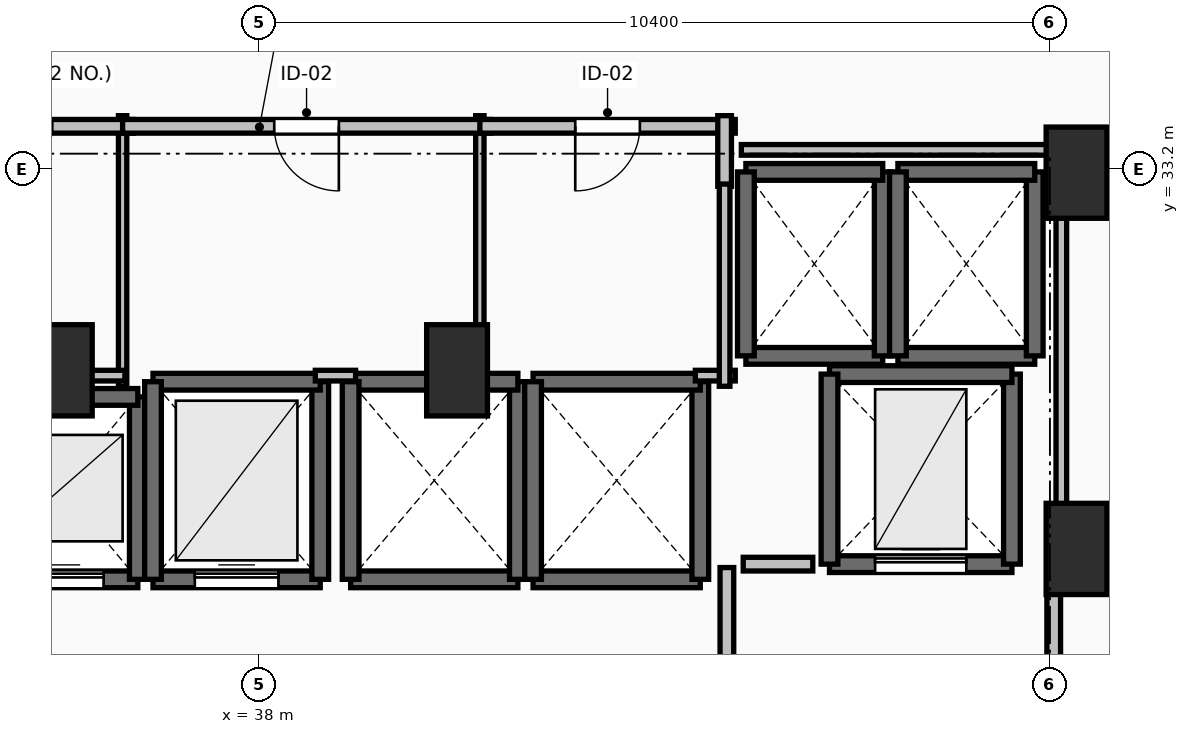
"""IFC4 building model, lengths in metres.
Left out: names, types, materials, properties, quantities, classifications, styles, units other than length and angle.
Written with IfcOpenShell. Run it as: python <this file> out.ifc"""

import sys

from ifc_helpers import new_model, si_unit, direction, frame, frame_2d, origin, origin_2d, place, context, subcontext, project, spatial, rectangle, extrude, element, fill, save


model = new_model("IFC4")
c1 = context("Model", 3, precision=1e-05, world=origin(), true_north=direction((0.0, 1.0)))
c2 = subcontext(c1, "Body", "Model", "MODEL_VIEW")
j1 = project(units=[si_unit("LENGTHUNIT", "METRE"), si_unit("PLANEANGLEUNIT", "RADIAN")], contexts=[c1])
p1 = place(None, origin())
s1 = spatial("IfcSite", under=j1, at=p1, CompositionType="ELEMENT")
p2 = place(p1, origin())
s2 = spatial("IfcBuilding", under=s1, at=p2, CompositionType="ELEMENT")
p3 = place(p2, frame((0.0, 0.0, 85.8)))
s3 = spatial("IfcBuildingStorey", under=s2, at=p3, CompositionType="ELEMENT", Elevation=85.8)
for number, where, z_axis, x_axis in (
    (1, (48.75, 33.15, 0.0), (0.0, 0.0, 1.0), (1.0, 0.0, 0.0)),
    (2, (48.75, 28.2, 0.0), (0.0, 0.0, 1.0), (1.0, 0.0, 0.0)),
    (3, (35.4, 30.55, 0.0), (0.0, 0.0, 1.0), (1.0, 0.0, 0.0)),
    (4, (40.6, 30.55, 0.0), (0.0, 0.0, 1.0), (1.0, 0.0, 0.0)),
):
    element("IfcColumn", number, at=place(p3, frame(where, z_axis=z_axis, x_axis=x_axis)), inside=s3, PredefinedType="PILASTER", context=c2, shape_type="SweptSolid", body=[
        extrude(rectangle(XDim=0.8, YDim=1.2, at=origin_2d()), origin(), (0.0, 0.0, 1.0), 3.5),
    ])
p4 = place(p3, frame((34.4, 27.8, 0.0), z_axis=(0.0, 0.0, 1.0), x_axis=(1.0, 0.0, 0.0)))
e5 = element("IfcWall", 5, at=p4, inside=s3, PredefinedType="SOLIDWALL", context=c2, shape_type="SweptSolid", body=[
    extrude(rectangle(XDim=2.0, YDim=0.22, at=frame_2d((1.0, 0.0))), origin(), (0.0, 0.0, 1.0), 3.24),
])
p5 = place(p4, frame((0.45, 0.0, 0.0)))
e6 = element("IfcOpeningElement", 6, at=p5, cuts=e5, PredefinedType="OPENING", context=c2, shape_type="SweptSolid", body=[
    extrude(rectangle(XDim=1.1, YDim=2.2, at=frame_2d((0.55, 1.1))), frame((0.0, 0.125, 0.0), z_axis=(0.0, -1.0, 0.0), x_axis=(1.0, 0.0, 0.0)), (0.0, 0.0, 1.0), 0.25),
])
p6 = place(p3, frame((36.4, 27.8, 0.0), z_axis=(0.0, 0.0, 1.0), x_axis=(0.0, 1.0, 0.0)))
e7 = element("IfcWall", 7, at=p6, inside=s3, PredefinedType="SOLIDWALL", context=c2, shape_type="SweptSolid", body=[
    extrude(rectangle(XDim=2.4, YDim=0.22, at=frame_2d((1.2, 0.0))), origin(), (0.0, 0.0, 1.0), 3.24),
])
p7 = place(p3, frame((36.4, 30.2, 0.0), z_axis=(0.0, 0.0, 1.0), x_axis=(-1.0, 0.0, 0.0)))
e8 = element("IfcWall", 8, at=p7, inside=s3, PredefinedType="SOLIDWALL", context=c2, shape_type="SweptSolid", body=[
    extrude(rectangle(XDim=2.0, YDim=0.22, at=frame_2d((1.0, 0.0))), origin(), (0.0, 0.0, 1.0), 3.24),
])
p8 = place(p3, frame((36.6, 27.8, 0.0), z_axis=(0.0, 0.0, 1.0), x_axis=(1.0, 0.0, 0.0)))
e9 = element("IfcWall", 9, at=p8, inside=s3, PredefinedType="SOLIDWALL", context=c2, shape_type="SweptSolid", body=[
    extrude(rectangle(XDim=2.2, YDim=0.22, at=frame_2d((1.1, 0.0))), origin(), (0.0, 0.0, 1.0), 3.24),
])
p9 = place(p8, frame((0.55, 0.0, 0.0)))
e10 = element("IfcOpeningElement", 10, at=p9, cuts=e9, PredefinedType="OPENING", context=c2, shape_type="SweptSolid", body=[
    extrude(rectangle(XDim=1.1, YDim=2.2, at=frame_2d((0.55, 1.1))), frame((0.0, 0.125, 0.0), z_axis=(0.0, -1.0, 0.0), x_axis=(1.0, 0.0, 0.0)), (0.0, 0.0, 1.0), 0.25),
])
p10 = place(p3, frame((38.8, 27.8, 0.0), z_axis=(0.0, 0.0, 1.0), x_axis=(0.0, 1.0, 0.0)))
e11 = element("IfcWall", 11, at=p10, inside=s3, PredefinedType="SOLIDWALL", context=c2, shape_type="SweptSolid", body=[
    extrude(rectangle(XDim=2.6, YDim=0.22, at=frame_2d((1.3, 0.0))), origin(), (0.0, 0.0, 1.0), 3.24),
])
p11 = place(p3, frame((38.8, 30.4, 0.0), z_axis=(0.0, 0.0, 1.0), x_axis=(-1.0, 0.0, 0.0)))
e12 = element("IfcWall", 12, at=p11, inside=s3, PredefinedType="SOLIDWALL", context=c2, shape_type="SweptSolid", body=[
    extrude(rectangle(XDim=2.2, YDim=0.22, at=frame_2d((1.1, 0.0))), origin(), (0.0, 0.0, 1.0), 3.24),
])
p12 = place(p3, frame((36.6, 30.4, 0.0), z_axis=(0.0, 0.0, 1.0), x_axis=(0.0, -1.0, 0.0)))
e13 = element("IfcWall", 13, at=p12, inside=s3, PredefinedType="SOLIDWALL", context=c2, shape_type="SweptSolid", body=[
    extrude(rectangle(XDim=2.6, YDim=0.22, at=frame_2d((1.3, 0.0))), origin(), (0.0, 0.0, 1.0), 3.24),
])
p13 = place(p3, frame((39.2, 27.8, 0.0), z_axis=(0.0, 0.0, 1.0), x_axis=(1.0, 0.0, 0.0)))
e14 = element("IfcWall", 14, at=p13, inside=s3, PredefinedType="SOLIDWALL", context=c2, shape_type="SweptSolid", body=[
    extrude(rectangle(XDim=2.2, YDim=0.22, at=frame_2d((1.1, 0.0))), origin(), (0.0, 0.0, 1.0), 3.24),
])
p14 = place(p3, frame((41.4, 27.8, 0.0), z_axis=(0.0, 0.0, 1.0), x_axis=(0.0, 1.0, 0.0)))
e15 = element("IfcWall", 15, at=p14, inside=s3, PredefinedType="SOLIDWALL", context=c2, shape_type="SweptSolid", body=[
    extrude(rectangle(XDim=2.6, YDim=0.22, at=frame_2d((1.3, 0.0))), origin(), (0.0, 0.0, 1.0), 3.24),
])
p15 = place(p3, frame((41.4, 30.4, 0.0), z_axis=(0.0, 0.0, 1.0), x_axis=(-1.0, 0.0, 0.0)))
e16 = element("IfcWall", 16, at=p15, inside=s3, PredefinedType="SOLIDWALL", context=c2, shape_type="SweptSolid", body=[
    extrude(rectangle(XDim=2.2, YDim=0.22, at=frame_2d((1.1, 0.0))), origin(), (0.0, 0.0, 1.0), 3.24),
])
p16 = place(p3, frame((39.2, 30.4, 0.0), z_axis=(0.0, 0.0, 1.0), x_axis=(0.0, -1.0, 0.0)))
e17 = element("IfcWall", 17, at=p16, inside=s3, PredefinedType="SOLIDWALL", context=c2, shape_type="SweptSolid", body=[
    extrude(rectangle(XDim=2.6, YDim=0.22, at=frame_2d((1.3, 0.0))), origin(), (0.0, 0.0, 1.0), 3.24),
])
p17 = place(p3, frame((41.6, 27.8, 0.0), z_axis=(0.0, 0.0, 1.0), x_axis=(1.0, 0.0, 0.0)))
e18 = element("IfcWall", 18, at=p17, inside=s3, PredefinedType="SOLIDWALL", context=c2, shape_type="SweptSolid", body=[
    extrude(rectangle(XDim=2.2, YDim=0.22, at=frame_2d((1.1, 0.0))), origin(), (0.0, 0.0, 1.0), 3.24),
])
p18 = place(p3, frame((43.8, 27.8, 0.0), z_axis=(0.0, 0.0, 1.0), x_axis=(0.0, 1.0, 0.0)))
e19 = element("IfcWall", 19, at=p18, inside=s3, PredefinedType="SOLIDWALL", context=c2, shape_type="SweptSolid", body=[
    extrude(rectangle(XDim=2.6, YDim=0.22, at=frame_2d((1.3, 0.0))), origin(), (0.0, 0.0, 1.0), 3.24),
])
p19 = place(p3, frame((43.8, 30.4, 0.0), z_axis=(0.0, 0.0, 1.0), x_axis=(-1.0, 0.0, 0.0)))
e20 = element("IfcWall", 20, at=p19, inside=s3, PredefinedType="SOLIDWALL", context=c2, shape_type="SweptSolid", body=[
    extrude(rectangle(XDim=2.2, YDim=0.22, at=frame_2d((1.1, 0.0))), origin(), (0.0, 0.0, 1.0), 3.24),
])
p20 = place(p3, frame((41.6, 30.4, 0.0), z_axis=(0.0, 0.0, 1.0), x_axis=(0.0, -1.0, 0.0)))
e21 = element("IfcWall", 21, at=p20, inside=s3, PredefinedType="SOLIDWALL", context=c2, shape_type="SweptSolid", body=[
    extrude(rectangle(XDim=2.6, YDim=0.22, at=frame_2d((1.3, 0.0))), origin(), (0.0, 0.0, 1.0), 3.24),
])
p21 = place(p3, frame((44.4, 30.74, 0.0), z_axis=(0.0, 0.0, 1.0), x_axis=(1.0, 0.0, 0.0)))
e22 = element("IfcWall", 22, at=p21, inside=s3, PredefinedType="SOLIDWALL", context=c2, shape_type="SweptSolid", body=[
    extrude(rectangle(XDim=1.8, YDim=0.22, at=frame_2d((0.9, 0.0))), origin(), (0.0, 0.0, 1.0), 3.24),
])
p22 = place(p3, frame((46.2, 30.74, 0.0), z_axis=(0.0, 0.0, 1.0), x_axis=(0.0, 1.0, 0.0)))
e23 = element("IfcWall", 23, at=p22, inside=s3, PredefinedType="SOLIDWALL", context=c2, shape_type="SweptSolid", body=[
    extrude(rectangle(XDim=2.42, YDim=0.22, at=frame_2d((1.21, 0.0))), origin(), (0.0, 0.0, 1.0), 3.24),
])
p23 = place(p3, frame((46.2, 33.16, 0.0), z_axis=(0.0, 0.0, 1.0), x_axis=(-1.0, 0.0, 0.0)))
e24 = element("IfcWall", 24, at=p23, inside=s3, PredefinedType="SOLIDWALL", context=c2, shape_type="SweptSolid", body=[
    extrude(rectangle(XDim=1.8, YDim=0.22, at=frame_2d((0.9, 0.0))), origin(), (0.0, 0.0, 1.0), 3.24),
])
p24 = place(p3, frame((44.4, 33.16, 0.0), z_axis=(0.0, 0.0, 1.0), x_axis=(0.0, -1.0, 0.0)))
e25 = element("IfcWall", 25, at=p24, inside=s3, PredefinedType="SOLIDWALL", context=c2, shape_type="SweptSolid", body=[
    extrude(rectangle(XDim=2.42, YDim=0.22, at=frame_2d((1.21, 0.0))), origin(), (0.0, 0.0, 1.0), 3.24),
])
p25 = place(p3, frame((46.4, 30.74, 0.0), z_axis=(0.0, 0.0, 1.0), x_axis=(1.0, 0.0, 0.0)))
e26 = element("IfcWall", 26, at=p25, inside=s3, PredefinedType="SOLIDWALL", context=c2, shape_type="SweptSolid", body=[
    extrude(rectangle(XDim=1.8, YDim=0.22, at=frame_2d((0.9, 0.0))), origin(), (0.0, 0.0, 1.0), 3.24),
])
p26 = place(p3, frame((48.2, 30.74, 0.0), z_axis=(0.0, 0.0, 1.0), x_axis=(0.0, 1.0, 0.0)))
e27 = element("IfcWall", 27, at=p26, inside=s3, PredefinedType="SOLIDWALL", context=c2, shape_type="SweptSolid", body=[
    extrude(rectangle(XDim=2.42, YDim=0.22, at=frame_2d((1.21, 0.0))), origin(), (0.0, 0.0, 1.0), 3.24),
])
p27 = place(p3, frame((48.2, 33.16, 0.0), z_axis=(0.0, 0.0, 1.0), x_axis=(-1.0, 0.0, 0.0)))
e28 = element("IfcWall", 28, at=p27, inside=s3, PredefinedType="SOLIDWALL", context=c2, shape_type="SweptSolid", body=[
    extrude(rectangle(XDim=1.8, YDim=0.22, at=frame_2d((0.9, 0.0))), origin(), (0.0, 0.0, 1.0), 3.24),
])
p28 = place(p3, frame((46.4, 33.16, 0.0), z_axis=(0.0, 0.0, 1.0), x_axis=(0.0, -1.0, 0.0)))
e29 = element("IfcWall", 29, at=p28, inside=s3, PredefinedType="SOLIDWALL", context=c2, shape_type="SweptSolid", body=[
    extrude(rectangle(XDim=2.42, YDim=0.22, at=frame_2d((1.21, 0.0))), origin(), (0.0, 0.0, 1.0), 3.24),
])
p29 = place(p3, frame((45.5, 28.0, 0.0), z_axis=(0.0, 0.0, 1.0), x_axis=(1.0, 0.0, 0.0)))
e30 = element("IfcWall", 30, at=p29, inside=s3, PredefinedType="SHEAR", context=c2, shape_type="SweptSolid", body=[
    extrude(rectangle(XDim=2.4, YDim=0.22, at=frame_2d((1.2, 0.0))), origin(), (0.0, 0.0, 1.0), 3.24),
])
p30 = place(p29, frame((0.6, 0.0, 0.0)))
e31 = element("IfcOpeningElement", 31, at=p30, cuts=e30, PredefinedType="OPENING", context=c2, shape_type="SweptSolid", body=[
    extrude(rectangle(XDim=1.2, YDim=2.2, at=frame_2d((0.6, 1.1))), frame((0.0, 0.125, 0.0), z_axis=(0.0, -1.0, 0.0), x_axis=(1.0, 0.0, 0.0)), (0.0, 0.0, 1.0), 0.25),
])
p31 = place(p3, frame((47.9, 28.0, 0.0), z_axis=(0.0, 0.0, 1.0), x_axis=(0.0, 1.0, 0.0)))
e32 = element("IfcWall", 32, at=p31, inside=s3, PredefinedType="SHEAR", context=c2, shape_type="SweptSolid", body=[
    extrude(rectangle(XDim=2.5, YDim=0.22, at=frame_2d((1.25, 0.0))), origin(), (0.0, 0.0, 1.0), 3.24),
])
p32 = place(p3, frame((47.9, 30.5, 0.0), z_axis=(0.0, 0.0, 1.0), x_axis=(-1.0, 0.0, 0.0)))
e33 = element("IfcWall", 33, at=p32, inside=s3, PredefinedType="SHEAR", context=c2, shape_type="SweptSolid", body=[
    extrude(rectangle(XDim=2.4, YDim=0.22, at=frame_2d((1.2, 0.0))), origin(), (0.0, 0.0, 1.0), 3.24),
])
p33 = place(p3, frame((45.5, 30.5, 0.0), z_axis=(0.0, 0.0, 1.0), x_axis=(0.0, -1.0, 0.0)))
e34 = element("IfcWall", 34, at=p33, inside=s3, PredefinedType="SHEAR", context=c2, shape_type="SweptSolid", body=[
    extrude(rectangle(XDim=2.5, YDim=0.22, at=frame_2d((1.25, 0.0))), origin(), (0.0, 0.0, 1.0), 3.24),
])
p34 = place(p3, frame((44.15, 27.955, 0.0), z_axis=(0.0, 0.0, 1.0), x_axis=(0.0, -1.0, 0.0)))
e35 = element("IfcWall", 35, at=p34, inside=s3, PredefinedType="PARTITIONING", context=c2, shape_type="SweptSolid", body=[
    extrude(rectangle(XDim=3.91, YDim=0.18, at=frame_2d((1.955, 0.0))), origin(), (0.0, 0.0, 1.0), 3.24),
])
p35 = place(p34, frame((1.355, 0.0, 0.0)))
e36 = element("IfcOpeningElement", 36, at=p35, cuts=e35, PredefinedType="OPENING", context=c2, shape_type="SweptSolid", body=[
    extrude(rectangle(XDim=1.2, YDim=2.15, at=frame_2d((0.6, 1.075))), frame((0.0, 0.105, 0.0), z_axis=(0.0, -1.0, 0.0), x_axis=(1.0, 0.0, 0.0)), (0.0, 0.0, 1.0), 0.21),
])
p36 = place(p3, frame((48.45, 23.95, 0.0), z_axis=(0.0, 0.0, 1.0), x_axis=(0.0, 1.0, 0.0)))
e37 = element("IfcWall", 37, at=p36, inside=s3, PredefinedType="PARTITIONING", context=c2, shape_type="SweptSolid", body=[
    extrude(rectangle(XDim=4.05, YDim=0.18, at=frame_2d((2.025, 0.0))), origin(), (0.0, 0.0, 1.0), 3.24),
])
p37 = place(p36, frame((1.425, 0.0, 0.0)))
e38 = element("IfcOpeningElement", 38, at=p37, cuts=e37, PredefinedType="OPENING", context=c2, shape_type="SweptSolid", body=[
    extrude(rectangle(XDim=1.2, YDim=2.15, at=frame_2d((0.6, 1.075))), frame((0.0, 0.105, 0.0), z_axis=(0.0, -1.0, 0.0), x_axis=(1.0, 0.0, 0.0)), (0.0, 0.0, 1.0), 0.21),
])
p38 = place(p3, frame((36.2, 30.34, 0.0), z_axis=(0.0, 0.0, 1.0), x_axis=(0.0, 1.0, 0.0)))
e39 = element("IfcWall", 39, at=p38, inside=s3, PredefinedType="PARTITIONING", context=c2, shape_type="SweptSolid", body=[
    extrude(rectangle(XDim=3.56, YDim=0.11, at=frame_2d((1.78, 0.0))), origin(), (0.0, 0.0, 1.0), 2.432),
])
p39 = place(p3, frame((36.34, 33.76, 0.0), z_axis=(0.0, 0.0, 1.0), x_axis=(-1.0, 0.0, 0.0)))
e40 = element("IfcWall", 40, at=p39, inside=s3, PredefinedType="PARTITIONING", context=c2, shape_type="SweptSolid", body=[
    extrude(rectangle(XDim=2.98, YDim=0.18, at=frame_2d((1.49, 0.0))), origin(), (0.0, 0.0, 1.0), 3.24),
])
p40 = place(p39, frame((1.065, 0.0, 0.0)))
e41 = element("IfcOpeningElement", 41, at=p40, cuts=e40, PredefinedType="OPENING", context=c2, shape_type="SweptSolid", body=[
    extrude(rectangle(XDim=0.85, YDim=2.1, at=frame_2d((0.425, 1.05))), frame((0.0, 0.105, 0.0), z_axis=(0.0, -1.0, 0.0), x_axis=(1.0, 0.0, 0.0)), (0.0, 0.0, 1.0), 0.21),
])
p41 = place(p3, frame((40.9, 30.34, 0.0), z_axis=(0.0, 0.0, 1.0), x_axis=(0.0, 1.0, 0.0)))
e42 = element("IfcWall", 42, at=p41, inside=s3, PredefinedType="PARTITIONING", context=c2, shape_type="SweptSolid", body=[
    extrude(rectangle(XDim=3.56, YDim=0.11, at=frame_2d((1.78, 0.0))), origin(), (0.0, 0.0, 1.0), 3.24),
])
p42 = place(p3, frame((41.04, 33.76, 0.0), z_axis=(0.0, 0.0, 1.0), x_axis=(-1.0, 0.0, 0.0)))
e43 = element("IfcWall", 43, at=p42, inside=s3, PredefinedType="PARTITIONING", context=c2, shape_type="SweptSolid", body=[
    extrude(rectangle(XDim=4.84, YDim=0.18, at=frame_2d((2.42, 0.0))), origin(), (0.0, 0.0, 1.0), 3.24),
])
p43 = place(p42, frame((1.995, 0.0, 0.0)))
e44 = element("IfcOpeningElement", 44, at=p43, cuts=e43, PredefinedType="OPENING", context=c2, shape_type="SweptSolid", body=[
    extrude(rectangle(XDim=0.85, YDim=2.1, at=frame_2d((0.425, 1.05))), frame((0.0, 0.105, 0.0), z_axis=(0.0, -1.0, 0.0), x_axis=(1.0, 0.0, 0.0)), (0.0, 0.0, 1.0), 0.21),
])
p44 = place(p3, frame((44.26, 33.76, 0.0), z_axis=(0.0, 0.0, 1.0), x_axis=(-1.0, 0.0, 0.0)))
e45 = element("IfcWall", 45, at=p44, inside=s3, PredefinedType="PARTITIONING", context=c2, shape_type="SweptSolid", body=[
    extrude(rectangle(XDim=3.36, YDim=0.18, at=frame_2d((1.68, 0.0))), origin(), (0.0, 0.0, 1.0), 3.24),
])
p45 = place(p44, frame((1.255, 0.0, 0.0)))
e46 = element("IfcOpeningElement", 46, at=p45, cuts=e45, PredefinedType="OPENING", context=c2, shape_type="SweptSolid", body=[
    extrude(rectangle(XDim=0.85, YDim=2.1, at=frame_2d((0.425, 1.05))), frame((0.0, 0.105, 0.0), z_axis=(0.0, -1.0, 0.0), x_axis=(1.0, 0.0, 0.0)), (0.0, 0.0, 1.0), 0.21),
])
p46 = place(p3, frame((44.12, 32.97, 0.0), z_axis=(0.0, 0.0, 1.0), x_axis=(0.0, 1.0, 0.0)))
e47 = element("IfcWall", 47, at=p46, inside=s3, PredefinedType="PARTITIONING", context=c2, shape_type="SweptSolid", body=[
    extrude(rectangle(XDim=0.93, YDim=0.18, at=frame_2d((0.465, 0.0))), origin(), (0.0, 0.0, 1.0), 3.24),
])
p47 = place(p3, frame((45.28, 28.0, 0.0), z_axis=(0.0, 0.0, 1.0), x_axis=(-1.0, 0.0, 0.0)))
e48 = element("IfcWall", 48, at=p47, inside=s3, PredefinedType="PARTITIONING", context=c2, shape_type="SweptSolid", body=[
    extrude(rectangle(XDim=0.915, YDim=0.18, at=frame_2d((0.458, 0.0))), origin(), (0.0, 0.0, 1.0), 3.24),
])
p48 = place(p3, frame((33.44, 30.48, 0.0), z_axis=(0.0, 0.0, 1.0), x_axis=(1.0, 0.0, 0.0)))
e49 = element("IfcWall", 49, at=p48, inside=s3, PredefinedType="PARTITIONING", context=c2, shape_type="SweptSolid", body=[
    extrude(rectangle(XDim=2.79, YDim=0.14, at=frame_2d((1.395, 0.0))), origin(), (0.0, 0.0, 1.0), 2.432),
])
p49 = place(p3, frame((38.735, 30.48, 0.0), z_axis=(0.0, 0.0, 1.0), x_axis=(1.0, 0.0, 0.0)))
e50 = element("IfcWall", 50, at=p49, inside=s3, PredefinedType="PARTITIONING", context=c2, shape_type="SweptSolid", body=[
    extrude(rectangle(XDim=0.53, YDim=0.14, at=frame_2d((0.265, 0.0))), origin(), (0.0, 0.0, 1.0), 2.432),
])
p50 = place(p3, frame((43.735, 30.48, 0.0), z_axis=(0.0, 0.0, 1.0), x_axis=(1.0, 0.0, 0.0)))
e51 = element("IfcWall", 51, at=p50, inside=s3, PredefinedType="PARTITIONING", context=c2, shape_type="SweptSolid", body=[
    extrude(rectangle(XDim=0.525, YDim=0.14, at=frame_2d((0.262, 0.0))), origin(), (0.0, 0.0, 1.0), 3.24),
])
p51 = place(p3, frame((44.12, 30.34, 0.0), z_axis=(0.0, 0.0, 1.0), x_axis=(0.0, 1.0, 0.0)))
e52 = element("IfcWall", 52, at=p51, inside=s3, PredefinedType="PARTITIONING", context=c2, shape_type="SweptSolid", body=[
    extrude(rectangle(XDim=2.66, YDim=0.14, at=frame_2d((1.33, 0.0))), origin(), (0.0, 0.0, 1.0), 3.24),
])
p52 = place(p3, frame((44.34, 33.45, 0.0), z_axis=(0.0, 0.0, 1.0), x_axis=(1.0, 0.0, 0.0)))
e53 = element("IfcWall", 53, at=p52, inside=s3, PredefinedType="PARTITIONING", context=c2, shape_type="SweptSolid", body=[
    extrude(rectangle(XDim=4.21, YDim=0.14, at=frame_2d((2.105, 0.0))), origin(), (0.0, 0.0, 1.0), 2.432),
])
p53 = place(p3, frame((48.55, 33.45, 0.0), z_axis=(0.0, 0.0, 1.0), x_axis=(0.0, -1.0, 0.0)))
e54 = element("IfcWall", 54, at=p53, inside=s3, PredefinedType="PARTITIONING", context=c2, shape_type="SweptSolid", body=[
    extrude(rectangle(XDim=5.254, YDim=0.14, at=frame_2d((2.627, 0.0))), origin(), (0.0, 0.0, 1.0), 2.432),
])
p54 = place(p5, origin())
e55 = element("IfcDoor", 55, at=p54, inside=s3, OperationType="SLIDING_TO_LEFT", PredefinedType="DOOR", context=c2, shape_type="SweptSolid", body=[
    extrude(rectangle(XDim=1.1, YDim=2.2, at=frame_2d((0.55, 1.1))), frame((0.0, 0.025, 0.0), z_axis=(0.0, -1.0, 0.0), x_axis=(1.0, 0.0, 0.0)), (0.0, 0.0, 1.0), 0.05),
])
fill(e6, e55)
p55 = place(p9, origin())
e56 = element("IfcDoor", 56, at=p55, inside=s3, OperationType="SLIDING_TO_LEFT", PredefinedType="DOOR", context=c2, shape_type="SweptSolid", body=[
    extrude(rectangle(XDim=1.1, YDim=2.2, at=frame_2d((0.55, 1.1))), frame((0.0, 0.025, 0.0), z_axis=(0.0, -1.0, 0.0), x_axis=(1.0, 0.0, 0.0)), (0.0, 0.0, 1.0), 0.05),
])
fill(e10, e56)
p56 = place(p30, origin())
e57 = element("IfcDoor", 57, at=p56, inside=s3, OperationType="SLIDING_TO_LEFT", PredefinedType="DOOR", context=c2, shape_type="SweptSolid", body=[
    extrude(rectangle(XDim=1.2, YDim=2.2, at=frame_2d((0.6, 1.1))), frame((0.0, 0.025, 0.0), z_axis=(0.0, -1.0, 0.0), x_axis=(1.0, 0.0, 0.0)), (0.0, 0.0, 1.0), 0.05),
])
fill(e31, e57)
p57 = place(p40, origin())
e58 = element("IfcDoor", 58, at=p57, inside=s3, OperationType="SINGLE_SWING_RIGHT", PredefinedType="DOOR", context=c2, shape_type="SweptSolid", body=[
    extrude(rectangle(XDim=0.85, YDim=2.1, at=frame_2d((0.425, 1.05))), frame((0.0, 0.025, 0.0), z_axis=(0.0, -1.0, 0.0), x_axis=(1.0, 0.0, 0.0)), (0.0, 0.0, 1.0), 0.05),
])
fill(e41, e58)
p58 = place(p43, origin())
e59 = element("IfcDoor", 59, at=p58, inside=s3, OperationType="SINGLE_SWING_LEFT", PredefinedType="DOOR", context=c2, shape_type="SweptSolid", body=[
    extrude(rectangle(XDim=0.85, YDim=2.1, at=frame_2d((0.425, 1.05))), frame((0.0, 0.025, 0.0), z_axis=(0.0, -1.0, 0.0), x_axis=(1.0, 0.0, 0.0)), (0.0, 0.0, 1.0), 0.05),
])
fill(e44, e59)
p59 = place(p45, origin())
e60 = element("IfcDoor", 60, at=p59, inside=s3, OperationType="SINGLE_SWING_RIGHT", PredefinedType="DOOR", context=c2, shape_type="SweptSolid", body=[
    extrude(rectangle(XDim=0.85, YDim=2.1, at=frame_2d((0.425, 1.05))), frame((0.0, 0.025, 0.0), z_axis=(0.0, -1.0, 0.0), x_axis=(1.0, 0.0, 0.0)), (0.0, 0.0, 1.0), 0.05),
])
fill(e46, e60)
save(model, sys.argv[1])
